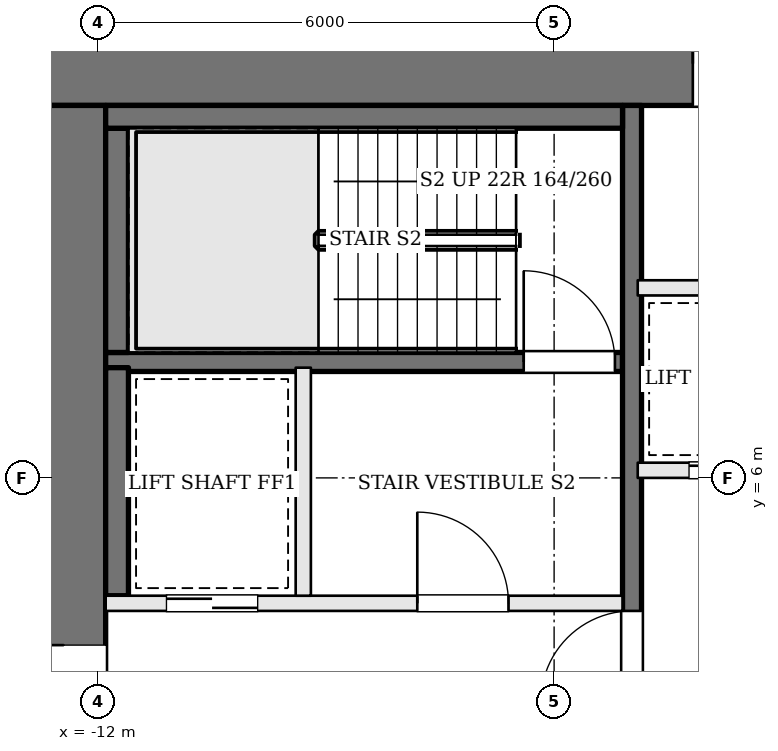
"""IFC4 building model, lengths in metres.
Left out: names, types, materials, properties, quantities, classifications, styles, units other than length and angle.
Written with IfcOpenShell. Run it as: python <this file> out.ifc"""

import sys

from ifc_helpers import new_model, si_unit, direction, frame, frame_2d, origin, place, context, subcontext, project, spatial, rectangle, extrude, element, fill, save


model = new_model("IFC4")
c1 = context("Model", 3, precision=1e-05, world=origin(), true_north=direction((0.0, 1.0)))
c2 = subcontext(c1, "Body", "Model", "MODEL_VIEW")
j1 = project(units=[si_unit("LENGTHUNIT", "METRE"), si_unit("PLANEANGLEUNIT", "RADIAN")], contexts=[c1])
p1 = place(None, origin())
s1 = spatial("IfcSite", under=j1, at=p1, CompositionType="ELEMENT")
p2 = place(p1, origin())
s2 = spatial("IfcBuilding", under=s1, at=p2, CompositionType="ELEMENT")
p3 = place(p2, frame((0.0, 0.0, 81.6)))
s3 = spatial("IfcBuildingStorey", under=s2, at=p3, CompositionType="ELEMENT", Elevation=81.6)
p4 = place(p3, frame((-13.0, 11.45, 0.0), z_axis=(0.0, 0.0, 1.0), x_axis=(1.0, 0.0, 0.0)))
e1 = element("IfcWall", 1, at=p4, inside=s3, PredefinedType="SHEAR", context=c2, shape_type="SweptSolid", body=[
    extrude(rectangle(XDim=26.0, YDim=1.1, at=frame_2d((13.0, 0.0))), origin(), (0.0, 0.0, 1.0), 3.6),
])
p5 = place(p4, frame((8.825, 0.0, 0.0)))
e2 = element("IfcOpeningElement", 2, at=p5, cuts=e1, PredefinedType="OPENING", context=c2, shape_type="SweptSolid", body=[
    extrude(rectangle(XDim=1.0, YDim=2.1, at=frame_2d((0.5, 1.05))), frame((0.0, 0.56, 0.0), z_axis=(0.0, -1.0, 0.0), x_axis=(1.0, 0.0, 0.0)), (0.0, 0.0, 1.0), 1.12),
])
p6 = place(p4, frame((11.275, 0.0, 0.0)))
e3 = element("IfcOpeningElement", 3, at=p6, cuts=e1, PredefinedType="OPENING", context=c2, shape_type="SweptSolid", body=[
    extrude(rectangle(XDim=1.0, YDim=2.1, at=frame_2d((0.5, 1.05))), frame((0.0, 0.56, 0.0), z_axis=(0.0, -1.0, 0.0), x_axis=(1.0, 0.0, 0.0)), (0.0, 0.0, 1.0), 1.12),
])
p7 = place(p4, frame((14.125, 0.0, 0.0)))
e4 = element("IfcOpeningElement", 4, at=p7, cuts=e1, PredefinedType="OPENING", context=c2, shape_type="SweptSolid", body=[
    extrude(rectangle(XDim=1.0, YDim=2.1, at=frame_2d((0.5, 1.05))), frame((0.0, 0.56, 0.0), z_axis=(0.0, -1.0, 0.0), x_axis=(1.0, 0.0, 0.0)), (0.0, 0.0, 1.0), 1.12),
])
p8 = place(p4, frame((16.725, 0.0, 0.0)))
e5 = element("IfcOpeningElement", 5, at=p8, cuts=e1, PredefinedType="OPENING", context=c2, shape_type="SweptSolid", body=[
    extrude(rectangle(XDim=0.7, YDim=2.1, at=frame_2d((0.35, 1.05))), frame((0.0, 0.56, 0.0), z_axis=(0.0, -1.0, 0.0), x_axis=(1.0, 0.0, 0.0)), (0.0, 0.0, 1.0), 1.12),
])
p9 = place(p3, frame((-12.45, -1.9, 0.0), z_axis=(0.0, 0.0, 1.0), x_axis=(0.0, 1.0, 0.0)))
e6 = element("IfcWall", 6, at=p9, inside=s3, PredefinedType="SHEAR", context=c2, shape_type="SweptSolid", body=[
    extrude(rectangle(XDim=12.8, YDim=1.1, at=frame_2d((6.4, 0.0))), origin(), (0.0, 0.0, 1.0), 3.6),
])
p10 = place(p9, frame((3.9, 0.0, 0.0)))
e7 = element("IfcOpeningElement", 7, at=p10, cuts=e6, PredefinedType="OPENING", context=c2, shape_type="SweptSolid", body=[
    extrude(rectangle(XDim=1.8, YDim=2.1, at=frame_2d((0.9, 1.05))), frame((0.0, 0.56, 0.0), z_axis=(0.0, -1.0, 0.0), x_axis=(1.0, 0.0, 0.0)), (0.0, 0.0, 1.0), 1.12),
])
p11 = place(p3, frame((-11.9, 4.35, 0.0), z_axis=(0.0, 0.0, 1.0), x_axis=(1.0, 0.0, 0.0)))
e8 = element("IfcWall", 8, at=p11, inside=s3, PredefinedType="SOLIDWALL", context=c2, shape_type="SweptSolid", body=[
    extrude(rectangle(XDim=6.8, YDim=0.2, at=frame_2d((3.4, 0.0))), origin(), (0.0, 0.0, 1.0), 3.4),
])
p12 = place(p11, frame((4.1, 0.0, 0.0)))
e9 = element("IfcOpeningElement", 9, at=p12, cuts=e8, PredefinedType="OPENING", context=c2, shape_type="SweptSolid", body=[
    extrude(rectangle(XDim=1.2, YDim=2.1, at=frame_2d((0.6, 1.05))), frame((0.0, 0.11, 0.0), z_axis=(0.0, -1.0, 0.0), x_axis=(1.0, 0.0, 0.0)), (0.0, 0.0, 1.0), 0.22),
])
p13 = place(p11, frame((0.8, 0.0, 0.0)))
e10 = element("IfcOpeningElement", 10, at=p13, cuts=e8, PredefinedType="OPENING", context=c2, shape_type="SweptSolid", body=[
    extrude(rectangle(XDim=1.2, YDim=2.1, at=frame_2d((0.6, 1.05))), frame((0.0, 0.11, 0.0), z_axis=(0.0, -1.0, 0.0), x_axis=(1.0, 0.0, 0.0)), (0.0, 0.0, 1.0), 0.22),
])
p14 = place(p3, frame((-11.9, 7.525, 0.0), z_axis=(0.0, 0.0, 1.0), x_axis=(1.0, 0.0, 0.0)))
e11 = element("IfcWall", 11, at=p14, inside=s3, PredefinedType="SOLIDWALL", context=c2, shape_type="SweptSolid", body=[
    extrude(rectangle(XDim=6.8, YDim=0.25, at=frame_2d((3.4, 0.0))), origin(), (0.0, 0.0, 1.0), 3.4),
])
p15 = place(p14, frame((5.5, 0.0, 0.0)))
e12 = element("IfcOpeningElement", 12, at=p15, cuts=e11, PredefinedType="OPENING", context=c2, shape_type="SweptSolid", body=[
    extrude(rectangle(XDim=1.2, YDim=2.1, at=frame_2d((0.6, 1.05))), frame((0.0, 0.135, 0.0), z_axis=(0.0, -1.0, 0.0), x_axis=(1.0, 0.0, 0.0)), (0.0, 0.0, 1.0), 0.27),
])
p16 = place(p3, frame((-9.3, 4.45, 0.0), z_axis=(0.0, 0.0, 1.0), x_axis=(0.0, 1.0, 0.0)))
e13 = element("IfcWall", 13, at=p16, inside=s3, PredefinedType="SOLIDWALL", context=c2, shape_type="SweptSolid", body=[
    extrude(rectangle(XDim=3.0, YDim=0.2, at=frame_2d((1.5, 0.0))), origin(), (0.0, 0.0, 1.0), 3.4),
])
p17 = place(p3, frame((-4.975, -1.9, 0.0), z_axis=(0.0, 0.0, 1.0), x_axis=(0.0, 1.0, 0.0)))
e14 = element("IfcWall", 14, at=p17, inside=s3, PredefinedType="SOLIDWALL", context=c2, shape_type="SweptSolid", body=[
    extrude(rectangle(XDim=12.8, YDim=0.25, at=frame_2d((6.4, 0.0))), origin(), (0.0, 0.0, 1.0), 3.4),
])
p18 = place(p17, frame((4.95, 0.0, 0.0)))
e15 = element("IfcOpeningElement", 15, at=p18, cuts=e14, PredefinedType="OPENING", context=c2, shape_type="SweptSolid", body=[
    extrude(rectangle(XDim=1.2, YDim=2.1, at=frame_2d((0.6, 1.05))), frame((0.0, 0.135, 0.0), z_axis=(0.0, -1.0, 0.0), x_axis=(1.0, 0.0, 0.0)), (0.0, 0.0, 1.0), 0.27),
])
p19 = place(p3, frame((-11.75, 4.45, 0.0), z_axis=(0.0, 0.0, 1.0), x_axis=(0.0, 1.0, 0.0)))
e16 = element("IfcWall", 16, at=p19, inside=s3, PredefinedType="SOLIDWALL", context=c2, shape_type="SweptSolid", body=[
    extrude(rectangle(XDim=3.0, YDim=0.3, at=frame_2d((1.5, 0.0))), origin(), (0.0, 0.0, 1.0), 3.4),
])
p20 = place(p3, frame((-11.75, 7.65, 0.0), z_axis=(0.0, 0.0, 1.0), x_axis=(0.0, 1.0, 0.0)))
e17 = element("IfcWall", 17, at=p20, inside=s3, PredefinedType="SOLIDWALL", context=c2, shape_type="SweptSolid", body=[
    extrude(rectangle(XDim=2.95, YDim=0.3, at=frame_2d((1.475, 0.0))), origin(), (0.0, 0.0, 1.0), 3.4),
])
p21 = place(p3, frame((-11.9, 10.75, 0.0), z_axis=(0.0, 0.0, 1.0), x_axis=(1.0, 0.0, 0.0)))
e18 = element("IfcWall", 18, at=p21, inside=s3, PredefinedType="SOLIDWALL", context=c2, shape_type="SweptSolid", body=[
    extrude(rectangle(XDim=6.8, YDim=0.3, at=frame_2d((3.4, 0.0))), origin(), (0.0, 0.0, 1.0), 3.4),
])
p22 = place(p3, frame((-4.9, 6.1, 0.0), z_axis=(0.0, 0.0, 1.0), x_axis=(1.0, 0.0, 0.0)))
e19 = element("IfcWall", 19, at=p22, inside=s3, PredefinedType="SOLIDWALL", context=c2, shape_type="SweptSolid", body=[
    extrude(rectangle(XDim=9.8, YDim=0.2, at=frame_2d((4.9, 0.0))), origin(), (0.0, 0.0, 1.0), 3.4),
])
p23 = place(p22, frame((0.675, 0.0, 0.0)))
e20 = element("IfcOpeningElement", 20, at=p23, cuts=e19, PredefinedType="OPENING", context=c2, shape_type="SweptSolid", body=[
    extrude(rectangle(XDim=1.1, YDim=2.1, at=frame_2d((0.55, 1.05))), frame((0.0, 0.11, 0.0), z_axis=(0.0, -1.0, 0.0), x_axis=(1.0, 0.0, 0.0)), (0.0, 0.0, 1.0), 0.22),
])
p24 = place(p22, frame((3.125, 0.0, 0.0)))
e21 = element("IfcOpeningElement", 21, at=p24, cuts=e19, PredefinedType="OPENING", context=c2, shape_type="SweptSolid", body=[
    extrude(rectangle(XDim=1.1, YDim=2.1, at=frame_2d((0.55, 1.05))), frame((0.0, 0.11, 0.0), z_axis=(0.0, -1.0, 0.0), x_axis=(1.0, 0.0, 0.0)), (0.0, 0.0, 1.0), 0.22),
])
p25 = place(p22, frame((5.575, 0.0, 0.0)))
e22 = element("IfcOpeningElement", 22, at=p25, cuts=e19, PredefinedType="OPENING", context=c2, shape_type="SweptSolid", body=[
    extrude(rectangle(XDim=1.1, YDim=2.1, at=frame_2d((0.55, 1.05))), frame((0.0, 0.11, 0.0), z_axis=(0.0, -1.0, 0.0), x_axis=(1.0, 0.0, 0.0)), (0.0, 0.0, 1.0), 0.22),
])
p26 = place(p22, frame((8.025, 0.0, 0.0)))
e23 = element("IfcOpeningElement", 23, at=p26, cuts=e19, PredefinedType="OPENING", context=c2, shape_type="SweptSolid", body=[
    extrude(rectangle(XDim=1.1, YDim=2.1, at=frame_2d((0.55, 1.05))), frame((0.0, 0.11, 0.0), z_axis=(0.0, -1.0, 0.0), x_axis=(1.0, 0.0, 0.0)), (0.0, 0.0, 1.0), 0.22),
])
p27 = place(p3, frame((-4.9, 8.5, 0.0), z_axis=(0.0, 0.0, 1.0), x_axis=(1.0, 0.0, 0.0)))
e24 = element("IfcWall", 24, at=p27, inside=s3, PredefinedType="SOLIDWALL", context=c2, shape_type="SweptSolid", body=[
    extrude(rectangle(XDim=9.8, YDim=0.2, at=frame_2d((4.9, 0.0))), origin(), (0.0, 0.0, 1.0), 3.4),
])
p28 = place(p10, origin())
e25 = element("IfcDoor", 25, at=p28, inside=s3, OperationType="DOUBLE_DOOR_SINGLE_SWING", PredefinedType="DOOR", context=c2, shape_type="SweptSolid", body=[
    extrude(rectangle(XDim=1.8, YDim=2.1, at=frame_2d((0.9, 1.05))), frame((0.0, 0.025, 0.0), z_axis=(0.0, -1.0, 0.0), x_axis=(1.0, 0.0, 0.0)), (0.0, 0.0, 1.0), 0.05),
])
fill(e7, e25)
p29 = place(p18, origin())
e26 = element("IfcDoor", 26, at=p29, inside=s3, OperationType="SINGLE_SWING_LEFT", PredefinedType="DOOR", context=c2, shape_type="SweptSolid", body=[
    extrude(rectangle(XDim=1.2, YDim=2.1, at=frame_2d((0.6, 1.05))), frame((0.0, 0.025, 0.0), z_axis=(0.0, -1.0, 0.0), x_axis=(1.0, 0.0, 0.0)), (0.0, 0.0, 1.0), 0.05),
])
fill(e15, e26)
p30 = place(p12, origin())
e27 = element("IfcDoor", 27, at=p30, inside=s3, OperationType="SINGLE_SWING_LEFT", PredefinedType="DOOR", context=c2, shape_type="SweptSolid", body=[
    extrude(rectangle(XDim=1.2, YDim=2.1, at=frame_2d((0.6, 1.05))), frame((0.0, 0.025, 0.0), z_axis=(0.0, -1.0, 0.0), x_axis=(1.0, 0.0, 0.0)), (0.0, 0.0, 1.0), 0.05),
])
fill(e9, e27)
p31 = place(p15, origin())
e28 = element("IfcDoor", 28, at=p31, inside=s3, OperationType="SINGLE_SWING_LEFT", PredefinedType="DOOR", context=c2, shape_type="SweptSolid", body=[
    extrude(rectangle(XDim=1.2, YDim=2.1, at=frame_2d((0.6, 1.05))), frame((0.0, 0.025, 0.0), z_axis=(0.0, -1.0, 0.0), x_axis=(1.0, 0.0, 0.0)), (0.0, 0.0, 1.0), 0.05),
])
fill(e12, e28)
p32 = place(p13, origin())
e29 = element("IfcDoor", 29, at=p32, inside=s3, OperationType="SLIDING_TO_RIGHT", PredefinedType="DOOR", context=c2, shape_type="SweptSolid", body=[
    extrude(rectangle(XDim=1.2, YDim=2.1, at=frame_2d((0.6, 1.05))), frame((0.0, 0.025, 0.0), z_axis=(0.0, -1.0, 0.0), x_axis=(1.0, 0.0, 0.0)), (0.0, 0.0, 1.0), 0.05),
])
fill(e10, e29)
p33 = place(p23, origin())
e30 = element("IfcDoor", 30, at=p33, inside=s3, OperationType="SLIDING_TO_RIGHT", PredefinedType="DOOR", context=c2, shape_type="SweptSolid", body=[
    extrude(rectangle(XDim=1.1, YDim=2.1, at=frame_2d((0.55, 1.05))), frame((0.0, 0.025, 0.0), z_axis=(0.0, -1.0, 0.0), x_axis=(1.0, 0.0, 0.0)), (0.0, 0.0, 1.0), 0.05),
])
fill(e20, e30)
p34 = place(p5, origin())
e31 = element("IfcDoor", 31, at=p34, inside=s3, OperationType="SINGLE_SWING_LEFT", PredefinedType="DOOR", context=c2, shape_type="SweptSolid", body=[
    extrude(rectangle(XDim=1.0, YDim=2.1, at=frame_2d((0.5, 1.05))), frame((0.0, 0.025, 0.0), z_axis=(0.0, -1.0, 0.0), x_axis=(1.0, 0.0, 0.0)), (0.0, 0.0, 1.0), 0.05),
])
fill(e2, e31)
save(model, sys.argv[1])
